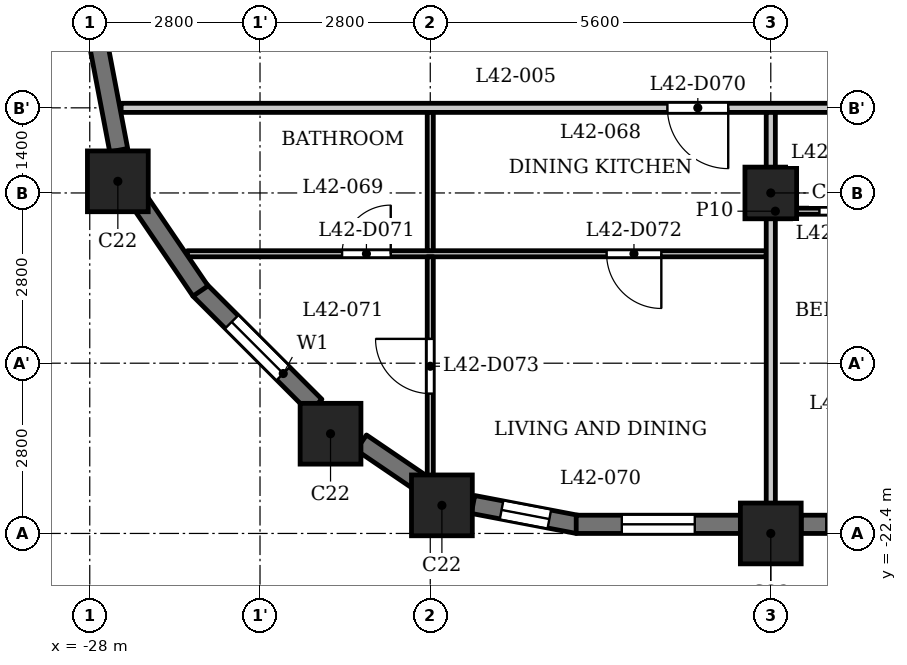
"""IFC4 building model, lengths in metres.
Left out: names, types, materials, properties, quantities, classifications, styles, units other than length and angle.
Written with IfcOpenShell. Run it as: python <this file> out.ifc"""

import sys

from ifc_helpers import new_model, si_unit, direction, frame, frame_2d, origin, origin_2d, place, context, subcontext, project, spatial, rectangle, extrude, element, fill, save


model = new_model("IFC4")
c1 = context("Model", 3, precision=1e-05, world=origin(), true_north=direction((0.0, 1.0)))
c2 = subcontext(c1, "Body", "Model", "MODEL_VIEW")
j1 = project(units=[si_unit("LENGTHUNIT", "METRE"), si_unit("PLANEANGLEUNIT", "RADIAN")], contexts=[c1])
p1 = place(None, origin())
s1 = spatial("IfcSite", under=j1, at=p1, CompositionType="ELEMENT")
p2 = place(p1, origin())
s2 = spatial("IfcBuilding", under=s1, at=p2, CompositionType="ELEMENT")
p3 = place(p2, frame((0.0, 0.0, 164.1)))
s3 = spatial("IfcBuildingStorey", under=s2, at=p3, CompositionType="ELEMENT", Elevation=164.1)
for number, where, z_axis, x_axis in (
    (1, (-22.209, -21.938, 0.0), (0.0, 0.0, 1.0), (1.0, 0.0, 0.0)),
    (2, (-16.8, -22.4, 0.0), (0.0, 0.0, 1.0), (1.0, 0.0, 0.0)),
    (3, (-27.538, -16.609, 0.0), (0.0, 0.0, 1.0), (1.0, 0.0, 0.0)),
    (4, (-24.04, -20.76, 0.0), (0.0, 0.0, 1.0), (1.0, 0.0, 0.0)),
):
    element("IfcColumn", number, at=place(p3, frame(where, z_axis=z_axis, x_axis=x_axis)), inside=s3, PredefinedType="COLUMN", context=c2, shape_type="SweptSolid", body=[
        extrude(rectangle(XDim=1.0, YDim=1.0, at=origin_2d()), origin(), (0.0, 0.0, 1.0), 3.5),
    ])
p4 = place(p3, frame((-16.8, -16.8, 0.0), z_axis=(0.0, 0.0, 1.0), x_axis=(1.0, 0.0, 0.0)))
e5 = element("IfcColumn", 5, at=p4, inside=s3, PredefinedType="COLUMN", context=c2, shape_type="SweptSolid", body=[
    extrude(rectangle(XDim=0.85, YDim=0.85, at=origin_2d()), origin(), (0.0, 0.0, 1.0), 3.5),
])
p5 = place(p3, frame((-26.197, -18.391, 0.0), z_axis=(0.0, 0.0, 1.0), x_axis=(0.707061571201, -0.707151988282, 0.0)))
e6 = element("IfcWall", 6, at=p5, inside=s3, PredefinedType="SOLIDWALL", context=c2, shape_type="SweptSolid", body=[
    extrude(rectangle(XDim=2.7, YDim=0.3, at=frame_2d((1.35, 0.0))), origin(), (0.0, 0.0, 1.0), 2.45),
])
p6 = place(p5, frame((0.75, 0.0, 0.6)))
e7 = element("IfcOpeningElement", 7, at=p6, cuts=e6, PredefinedType="OPENING", context=c2, shape_type="SweptSolid", body=[
    extrude(rectangle(XDim=1.2, YDim=1.55, at=frame_2d((0.6, 0.775))), frame((0.0, 0.16, 0.0), z_axis=(0.0, -1.0, 0.0), x_axis=(1.0, 0.0, 0.0)), (0.0, 0.0, 1.0), 0.32),
])
p7 = place(p3, frame((-23.534, -20.904, 0.0), z_axis=(0.0, 0.0, 1.0), x_axis=(0.827103906596, -0.56204904385, 0.0)))
e8 = element("IfcWall", 8, at=p7, inside=s3, PredefinedType="SOLIDWALL", context=c2, shape_type="SweptSolid", body=[
    extrude(rectangle(XDim=1.177, YDim=0.3, at=frame_2d((0.589, 0.0))), origin(), (0.0, 0.0, 1.0), 3.2),
])
p8 = place(p3, frame((-21.697, -21.924, 0.0), z_axis=(0.0, 0.0, 1.0), x_axis=(0.982284988433, -0.187393173565, 0.0)))
e9 = element("IfcWall", 9, at=p8, inside=s3, PredefinedType="SOLIDWALL", context=c2, shape_type="SweptSolid", body=[
    extrude(rectangle(XDim=1.756, YDim=0.3, at=frame_2d((0.878, 0.0))), origin(), (0.0, 0.0, 1.0), 2.45),
])
p9 = place(p8, frame((0.478, 0.0, 0.6)))
e10 = element("IfcOpeningElement", 10, at=p9, cuts=e9, PredefinedType="OPENING", context=c2, shape_type="SweptSolid", body=[
    extrude(rectangle(XDim=0.8, YDim=1.55, at=frame_2d((0.4, 0.775))), frame((0.0, 0.16, 0.0), z_axis=(0.0, -1.0, 0.0), x_axis=(1.0, 0.0, 0.0)), (0.0, 0.0, 1.0), 0.32),
])
p10 = place(p3, frame((-20.0, -22.25, 0.0), z_axis=(0.0, 0.0, 1.0), x_axis=(1.0, 0.0, 0.0)))
e11 = element("IfcWall", 11, at=p10, inside=s3, PredefinedType="SOLIDWALL", context=c2, shape_type="SweptSolid", body=[
    extrude(rectangle(XDim=2.7, YDim=0.3, at=frame_2d((1.35, 0.0))), origin(), (0.0, 0.0, 1.0), 2.45),
])
p11 = place(p10, frame((0.75, 0.0, 0.6)))
e12 = element("IfcOpeningElement", 12, at=p11, cuts=e11, PredefinedType="OPENING", context=c2, shape_type="SweptSolid", body=[
    extrude(rectangle(XDim=1.2, YDim=1.55, at=frame_2d((0.6, 0.775))), frame((0.0, 0.16, 0.0), z_axis=(0.0, -1.0, 0.0), x_axis=(1.0, 0.0, 0.0)), (0.0, 0.0, 1.0), 0.32),
])
p12 = place(p3, frame((-16.3, -22.25, 0.0), z_axis=(0.0, 0.0, 1.0), x_axis=(1.0, 0.0, 0.0)))
e13 = element("IfcWall", 13, at=p12, inside=s3, PredefinedType="SOLIDWALL", context=c2, shape_type="SweptSolid", body=[
    extrude(rectangle(XDim=4.6, YDim=0.3, at=frame_2d((2.3, 0.0))), origin(), (0.0, 0.0, 1.0), 2.45),
])
p13 = place(p12, frame((0.413, 0.0, 0.6)))
e14 = element("IfcOpeningElement", 14, at=p13, cuts=e13, PredefinedType="OPENING", context=c2, shape_type="SweptSolid", body=[
    extrude(rectangle(XDim=1.2, YDim=1.55, at=frame_2d((0.6, 0.775))), frame((0.0, 0.16, 0.0), z_axis=(0.0, -1.0, 0.0), x_axis=(1.0, 0.0, 0.0)), (0.0, 0.0, 1.0), 0.32),
])
p14 = place(p12, frame((2.488, 0.0, 0.9)))
e15 = element("IfcOpeningElement", 15, at=p14, cuts=e13, PredefinedType="OPENING", context=c2, shape_type="SweptSolid", body=[
    extrude(rectangle(XDim=1.8, YDim=1.25, at=frame_2d((0.9, 0.625))), frame((0.0, 0.16, 0.0), z_axis=(0.0, -1.0, 0.0), x_axis=(1.0, 0.0, 0.0)), (0.0, 0.0, 1.0), 0.32),
])
for number, where, z_axis, x_axis in (
    (16, (-27.853, -14.372, 0.0), (0.0, 0.0, 1.0), (0.187, -0.982, 0.0)),
    (17, (-27.166, -16.96, 0.0), (0.0, 0.0, 1.0), (0.562, -0.827, 0.0)),
):
    element("IfcWall", number, at=place(p3, frame(where, z_axis=z_axis, x_axis=x_axis)), inside=s3, PredefinedType="SOLIDWALL", context=c2, shape_type="SweptSolid", body=[
        extrude(rectangle(XDim=1.756, YDim=0.3, at=frame_2d((0.878, 0.0))), origin(), (0.0, 0.0, 1.0), 2.45),
    ])
p15 = place(p3, frame((-26.394, -17.8, 0.0), z_axis=(0.0, 0.0, 1.0), x_axis=(1.0, 0.0, 0.0)))
e18 = element("IfcWall", 18, at=p15, inside=s3, PredefinedType="PARTITIONING", context=c2, shape_type="SweptSolid", body=[
    extrude(rectangle(XDim=9.519, YDim=0.1, at=frame_2d((4.76, 0.0))), origin(), (0.0, 0.0, 1.0), 3.2),
])
p16 = place(p15, frame((2.544, 0.0, 0.0)))
e19 = element("IfcOpeningElement", 19, at=p16, cuts=e18, PredefinedType="OPENING", context=c2, shape_type="SweptSolid", body=[
    extrude(rectangle(XDim=0.8, YDim=2.1, at=frame_2d((0.4, 1.05))), frame((0.0, 0.06, 0.0), z_axis=(0.0, -1.0, 0.0), x_axis=(1.0, 0.0, 0.0)), (0.0, 0.0, 1.0), 0.12),
])
p17 = place(p15, frame((6.894, 0.0, 0.0)))
e20 = element("IfcOpeningElement", 20, at=p17, cuts=e18, PredefinedType="OPENING", context=c2, shape_type="SweptSolid", body=[
    extrude(rectangle(XDim=0.9, YDim=2.1, at=frame_2d((0.45, 1.05))), frame((0.0, 0.06, 0.0), z_axis=(0.0, -1.0, 0.0), x_axis=(1.0, 0.0, 0.0)), (0.0, 0.0, 1.0), 0.12),
])
p18 = place(p3, frame((-16.725, -17.1, 0.0), z_axis=(0.0, 0.0, 1.0), x_axis=(1.0, 0.0, 0.0)))
e21 = element("IfcWall", 21, at=p18, inside=s3, PredefinedType="PARTITIONING", context=c2, shape_type="SweptSolid", body=[
    extrude(rectangle(XDim=33.45, YDim=0.1, at=frame_2d((16.725, 0.0))), origin(), (0.0, 0.0, 1.0), 3.2),
])
p19 = place(p18, frame((0.725, 0.0, 0.0)))
e22 = element("IfcOpeningElement", 22, at=p19, cuts=e21, PredefinedType="OPENING", context=c2, shape_type="SweptSolid", body=[
    extrude(rectangle(XDim=0.8, YDim=2.1, at=frame_2d((0.4, 1.05))), frame((0.0, 0.06, 0.0), z_axis=(0.0, -1.0, 0.0), x_axis=(1.0, 0.0, 0.0)), (0.0, 0.0, 1.0), 0.12),
])
p20 = place(p18, frame((3.175, 0.0, 0.0)))
e23 = element("IfcOpeningElement", 23, at=p20, cuts=e21, PredefinedType="OPENING", context=c2, shape_type="SweptSolid", body=[
    extrude(rectangle(XDim=0.9, YDim=2.1, at=frame_2d((0.45, 1.05))), frame((0.0, 0.06, 0.0), z_axis=(0.0, -1.0, 0.0), x_axis=(1.0, 0.0, 0.0)), (0.0, 0.0, 1.0), 0.12),
])
p21 = place(p18, frame((6.075, 0.0, 0.0)))
e24 = element("IfcOpeningElement", 24, at=p21, cuts=e21, PredefinedType="OPENING", context=c2, shape_type="SweptSolid", body=[
    extrude(rectangle(XDim=0.8, YDim=2.1, at=frame_2d((0.4, 1.05))), frame((0.0, 0.06, 0.0), z_axis=(0.0, -1.0, 0.0), x_axis=(1.0, 0.0, 0.0)), (0.0, 0.0, 1.0), 0.12),
])
p22 = place(p18, frame((9.425, 0.0, 0.0)))
e25 = element("IfcOpeningElement", 25, at=p22, cuts=e21, PredefinedType="OPENING", context=c2, shape_type="SweptSolid", body=[
    extrude(rectangle(XDim=0.9, YDim=2.1, at=frame_2d((0.45, 1.05))), frame((0.0, 0.06, 0.0), z_axis=(0.0, -1.0, 0.0), x_axis=(1.0, 0.0, 0.0)), (0.0, 0.0, 1.0), 0.12),
])
p23 = place(p18, frame((12.675, 0.0, 0.0)))
e26 = element("IfcOpeningElement", 26, at=p23, cuts=e21, PredefinedType="OPENING", context=c2, shape_type="SweptSolid", body=[
    extrude(rectangle(XDim=0.8, YDim=2.1, at=frame_2d((0.4, 1.05))), frame((0.0, 0.06, 0.0), z_axis=(0.0, -1.0, 0.0), x_axis=(1.0, 0.0, 0.0)), (0.0, 0.0, 1.0), 0.12),
])
p24 = place(p18, frame((15.275, 0.0, 0.0)))
e27 = element("IfcOpeningElement", 27, at=p24, cuts=e21, PredefinedType="OPENING", context=c2, shape_type="SweptSolid", body=[
    extrude(rectangle(XDim=0.9, YDim=2.1, at=frame_2d((0.45, 1.05))), frame((0.0, 0.06, 0.0), z_axis=(0.0, -1.0, 0.0), x_axis=(1.0, 0.0, 0.0)), (0.0, 0.0, 1.0), 0.12),
])
p25 = place(p18, frame((20.625, 0.0, 0.0)))
e28 = element("IfcOpeningElement", 28, at=p25, cuts=e21, PredefinedType="OPENING", context=c2, shape_type="SweptSolid", body=[
    extrude(rectangle(XDim=0.8, YDim=2.1, at=frame_2d((0.4, 1.05))), frame((0.0, 0.06, 0.0), z_axis=(0.0, -1.0, 0.0), x_axis=(1.0, 0.0, 0.0)), (0.0, 0.0, 1.0), 0.12),
])
p26 = place(p18, frame((17.375, 0.0, 0.0)))
e29 = element("IfcOpeningElement", 29, at=p26, cuts=e21, PredefinedType="OPENING", context=c2, shape_type="SweptSolid", body=[
    extrude(rectangle(XDim=0.9, YDim=2.1, at=frame_2d((0.45, 1.05))), frame((0.0, 0.06, 0.0), z_axis=(0.0, -1.0, 0.0), x_axis=(1.0, 0.0, 0.0)), (0.0, 0.0, 1.0), 0.12),
])
p27 = place(p18, frame((31.075, 0.0, 0.0)))
e30 = element("IfcOpeningElement", 30, at=p27, cuts=e21, PredefinedType="OPENING", context=c2, shape_type="SweptSolid", body=[
    extrude(rectangle(XDim=0.8, YDim=2.1, at=frame_2d((0.4, 1.05))), frame((0.0, 0.06, 0.0), z_axis=(0.0, -1.0, 0.0), x_axis=(1.0, 0.0, 0.0)), (0.0, 0.0, 1.0), 0.12),
])
p28 = place(p18, frame((29.325, 0.0, 0.0)))
e31 = element("IfcOpeningElement", 31, at=p28, cuts=e21, PredefinedType="OPENING", context=c2, shape_type="SweptSolid", body=[
    extrude(rectangle(XDim=0.9, YDim=2.1, at=frame_2d((0.45, 1.05))), frame((0.0, 0.06, 0.0), z_axis=(0.0, -1.0, 0.0), x_axis=(1.0, 0.0, 0.0)), (0.0, 0.0, 1.0), 0.12),
])
p29 = place(p18, frame((23.725, 0.0, 0.0)))
e32 = element("IfcOpeningElement", 32, at=p29, cuts=e21, PredefinedType="OPENING", context=c2, shape_type="SweptSolid", body=[
    extrude(rectangle(XDim=0.9, YDim=2.1, at=frame_2d((0.45, 1.05))), frame((0.0, 0.06, 0.0), z_axis=(0.0, -1.0, 0.0), x_axis=(1.0, 0.0, 0.0)), (0.0, 0.0, 1.0), 0.12),
])
p30 = place(p18, frame((25.775, 0.0, 0.0)))
e33 = element("IfcOpeningElement", 33, at=p30, cuts=e21, PredefinedType="OPENING", context=c2, shape_type="SweptSolid", body=[
    extrude(rectangle(XDim=0.9, YDim=2.1, at=frame_2d((0.45, 1.05))), frame((0.0, 0.06, 0.0), z_axis=(0.0, -1.0, 0.0), x_axis=(1.0, 0.0, 0.0)), (0.0, 0.0, 1.0), 0.12),
])
p31 = place(p3, frame((-27.484, -15.4, 0.0), z_axis=(0.0, 0.0, 1.0), x_axis=(1.0, 0.0, 0.0)))
e34 = element("IfcWall", 34, at=p31, inside=s3, PredefinedType="PARTITIONING", context=c2, shape_type="SweptSolid", body=[
    extrude(rectangle(XDim=12.559, YDim=0.15, at=frame_2d((6.279, 0.0))), origin(), (0.0, 0.0, 1.0), 3.2),
])
p32 = place(p31, frame((8.984, 0.0, 0.0)))
e35 = element("IfcOpeningElement", 35, at=p32, cuts=e34, PredefinedType="OPENING", context=c2, shape_type="SweptSolid", body=[
    extrude(rectangle(XDim=1.0, YDim=2.1, at=frame_2d((0.5, 1.05))), frame((0.0, 0.085, 0.0), z_axis=(0.0, -1.0, 0.0), x_axis=(1.0, 0.0, 0.0)), (0.0, 0.0, 1.0), 0.17),
])
p33 = place(p3, frame((-22.4, -21.72, 0.0), z_axis=(0.0, 0.0, 1.0), x_axis=(0.0, 1.0, 0.0)))
e36 = element("IfcWall", 36, at=p33, inside=s3, PredefinedType="PARTITIONING", context=c2, shape_type="SweptSolid", body=[
    extrude(rectangle(XDim=3.87, YDim=0.1, at=frame_2d((1.935, 0.0))), origin(), (0.0, 0.0, 1.0), 3.2),
])
p34 = place(p33, frame((1.62, 0.0, 0.0)))
e37 = element("IfcOpeningElement", 37, at=p34, cuts=e36, PredefinedType="OPENING", context=c2, shape_type="SweptSolid", body=[
    extrude(rectangle(XDim=0.9, YDim=2.1, at=frame_2d((0.45, 1.05))), frame((0.0, 0.06, 0.0), z_axis=(0.0, -1.0, 0.0), x_axis=(1.0, 0.0, 0.0)), (0.0, 0.0, 1.0), 0.12),
])
p35 = place(p3, frame((-22.4, -17.75, 0.0), z_axis=(0.0, 0.0, 1.0), x_axis=(0.0, 1.0, 0.0)))
e38 = element("IfcWall", 38, at=p35, inside=s3, PredefinedType="PARTITIONING", context=c2, shape_type="SweptSolid", body=[
    extrude(rectangle(XDim=2.275, YDim=0.1, at=frame_2d((1.137, 0.0))), origin(), (0.0, 0.0, 1.0), 3.2),
])
p36 = place(p3, frame((-16.8, -22.88, 0.0), z_axis=(0.0, 0.0, 1.0), x_axis=(0.0, 1.0, 0.0)))
e39 = element("IfcWall", 39, at=p36, inside=s3, PredefinedType="PARTITIONING", context=c2, shape_type="SweptSolid", body=[
    extrude(rectangle(XDim=7.405, YDim=0.15, at=frame_2d((3.702, 0.0))), origin(), (0.0, 0.0, 1.0), 3.2),
])
p37 = place(p19, origin())
e40 = element("IfcDoor", 40, at=p37, inside=s3, OperationType="SINGLE_SWING_LEFT", PredefinedType="DOOR", context=c2, shape_type="SweptSolid", body=[
    extrude(rectangle(XDim=0.8, YDim=2.1, at=frame_2d((0.4, 1.05))), frame((0.0, 0.025, 0.0), z_axis=(0.0, -1.0, 0.0), x_axis=(1.0, 0.0, 0.0)), (0.0, 0.0, 1.0), 0.05),
])
fill(e22, e40)
p38 = place(p32, origin())
e41 = element("IfcDoor", 41, at=p38, inside=s3, OperationType="SINGLE_SWING_RIGHT", PredefinedType="DOOR", context=c2, shape_type="SweptSolid", body=[
    extrude(rectangle(XDim=1.0, YDim=2.1, at=frame_2d((0.5, 1.05))), frame((0.0, 0.025, 0.0), z_axis=(0.0, -1.0, 0.0), x_axis=(1.0, 0.0, 0.0)), (0.0, 0.0, 1.0), 0.05),
])
fill(e35, e41)
p39 = place(p16, origin())
e42 = element("IfcDoor", 42, at=p39, inside=s3, OperationType="SINGLE_SWING_LEFT", PredefinedType="DOOR", context=c2, shape_type="SweptSolid", body=[
    extrude(rectangle(XDim=0.8, YDim=2.1, at=frame_2d((0.4, 1.05))), frame((0.0, 0.025, 0.0), z_axis=(0.0, -1.0, 0.0), x_axis=(1.0, 0.0, 0.0)), (0.0, 0.0, 1.0), 0.05),
])
fill(e19, e42)
p40 = place(p17, origin())
e43 = element("IfcDoor", 43, at=p40, inside=s3, OperationType="SINGLE_SWING_RIGHT", PredefinedType="DOOR", context=c2, shape_type="SweptSolid", body=[
    extrude(rectangle(XDim=0.9, YDim=2.1, at=frame_2d((0.45, 1.05))), frame((0.0, 0.025, 0.0), z_axis=(0.0, -1.0, 0.0), x_axis=(1.0, 0.0, 0.0)), (0.0, 0.0, 1.0), 0.05),
])
fill(e20, e43)
p41 = place(p34, origin())
e44 = element("IfcDoor", 44, at=p41, inside=s3, OperationType="SINGLE_SWING_LEFT", PredefinedType="DOOR", context=c2, shape_type="SweptSolid", body=[
    extrude(rectangle(XDim=0.9, YDim=2.1, at=frame_2d((0.45, 1.05))), frame((0.0, 0.025, 0.0), z_axis=(0.0, -1.0, 0.0), x_axis=(1.0, 0.0, 0.0)), (0.0, 0.0, 1.0), 0.05),
])
fill(e37, e44)
p42 = place(p6, origin())
e45 = element("IfcWindow", 45, at=p42, inside=s3, PartitioningType="SINGLE_PANEL", PredefinedType="WINDOW", context=c2, shape_type="SweptSolid", body=[
    extrude(rectangle(XDim=1.2, YDim=1.55, at=frame_2d((0.6, 0.775))), frame((0.0, 0.03, 0.0), z_axis=(0.0, -1.0, 0.0), x_axis=(1.0, 0.0, 0.0)), (0.0, 0.0, 1.0), 0.06),
])
fill(e7, e45)
p43 = place(p9, origin())
e46 = element("IfcWindow", 46, at=p43, inside=s3, PartitioningType="SINGLE_PANEL", PredefinedType="WINDOW", context=c2, shape_type="SweptSolid", body=[
    extrude(rectangle(XDim=0.8, YDim=1.55, at=frame_2d((0.4, 0.775))), frame((0.0, 0.03, 0.0), z_axis=(0.0, -1.0, 0.0), x_axis=(1.0, 0.0, 0.0)), (0.0, 0.0, 1.0), 0.06),
])
fill(e10, e46)
p44 = place(p11, origin())
e47 = element("IfcWindow", 47, at=p44, inside=s3, PartitioningType="SINGLE_PANEL", PredefinedType="WINDOW", context=c2, shape_type="SweptSolid", body=[
    extrude(rectangle(XDim=1.2, YDim=1.55, at=frame_2d((0.6, 0.775))), frame((0.0, 0.03, 0.0), z_axis=(0.0, -1.0, 0.0), x_axis=(1.0, 0.0, 0.0)), (0.0, 0.0, 1.0), 0.06),
])
fill(e12, e47)
p45 = place(p13, origin())
e48 = element("IfcWindow", 48, at=p45, inside=s3, PartitioningType="SINGLE_PANEL", PredefinedType="WINDOW", context=c2, shape_type="SweptSolid", body=[
    extrude(rectangle(XDim=1.2, YDim=1.55, at=frame_2d((0.6, 0.775))), frame((0.0, 0.03, 0.0), z_axis=(0.0, -1.0, 0.0), x_axis=(1.0, 0.0, 0.0)), (0.0, 0.0, 1.0), 0.06),
])
fill(e14, e48)
save(model, sys.argv[1])
